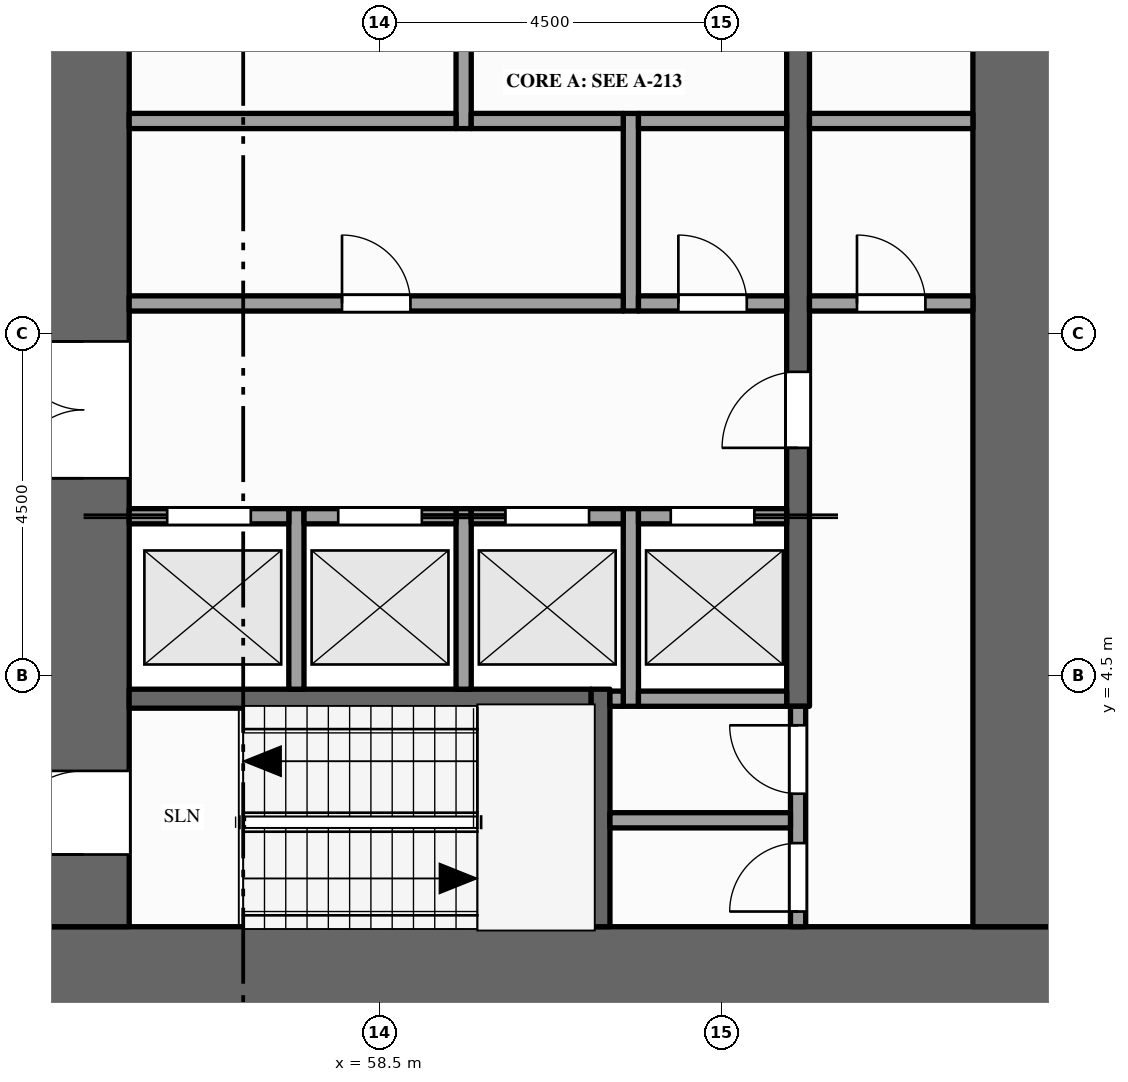
"""IFC4 building model, lengths in metres.
Left out: names, types, materials, properties, quantities, classifications, styles, units other than length and angle.
Written with IfcOpenShell. Run it as: python <this file> out.ifc"""

import sys

from ifc_helpers import new_model, si_unit, direction, frame, frame_2d, origin, place, context, subcontext, project, spatial, rectangle, extrude, element, fill, save


model = new_model("IFC4")
c1 = context("Model", 3, precision=1e-05, world=origin(), true_north=direction((0.0, 1.0)))
c2 = subcontext(c1, "Body", "Model", "MODEL_VIEW")
j1 = project(units=[si_unit("LENGTHUNIT", "METRE"), si_unit("PLANEANGLEUNIT", "RADIAN")], contexts=[c1])
p1 = place(None, origin())
s1 = spatial("IfcSite", under=j1, at=p1, CompositionType="ELEMENT")
p2 = place(p1, origin())
s2 = spatial("IfcBuilding", under=s1, at=p2, CompositionType="ELEMENT")
p3 = place(p2, frame((0.0, 0.0, 69.0)))
s3 = spatial("IfcBuildingStorey", under=s2, at=p3, CompositionType="ELEMENT", Elevation=69.0)
p4 = place(p3, frame((67.5, 0.6, -0.15), z_axis=(0.0, 0.0, 1.0), x_axis=(-1.0, 0.0, 0.0)))
e1 = element("IfcWall", 1, at=p4, inside=s3, PredefinedType="SHEAR", context=c2, shape_type="SweptSolid", body=[
    extrude(rectangle(XDim=13.5, YDim=1.2, at=frame_2d((6.75, 0.0))), origin(), (0.0, 0.0, 1.0), 4.0),
])
p5 = place(p3, frame((54.6, 1.2, -0.15), z_axis=(0.0, 0.0, 1.0), x_axis=(0.0, 1.0, 0.0)))
e2 = element("IfcWall", 2, at=p5, inside=s3, PredefinedType="SHEAR", context=c2, shape_type="SweptSolid", body=[
    extrude(rectangle(XDim=20.1, YDim=1.2, at=frame_2d((10.05, 0.0))), origin(), (0.0, 0.0, 1.0), 4.0),
])
p6 = place(p5, frame((5.9, 0.0, 0.15)))
e3 = element("IfcOpeningElement", 3, at=p6, cuts=e2, PredefinedType="OPENING", context=c2, shape_type="SweptSolid", body=[
    extrude(rectangle(XDim=1.8, YDim=2.1, at=frame_2d((0.9, 1.05))), frame((0.0, 0.61, 0.0), z_axis=(0.0, -1.0, 0.0), x_axis=(1.0, 0.0, 0.0)), (0.0, 0.0, 1.0), 1.22),
])
p7 = place(p5, frame((11.95, 0.0, 0.15)))
e4 = element("IfcOpeningElement", 4, at=p7, cuts=e2, PredefinedType="OPENING", context=c2, shape_type="SweptSolid", body=[
    extrude(rectangle(XDim=1.1, YDim=2.1, at=frame_2d((0.55, 1.05))), frame((0.0, 0.61, 0.0), z_axis=(0.0, -1.0, 0.0), x_axis=(1.0, 0.0, 0.0)), (0.0, 0.0, 1.0), 1.22),
])
p8 = place(p5, frame((0.95, 0.0, 0.15)))
e5 = element("IfcOpeningElement", 5, at=p8, cuts=e2, PredefinedType="OPENING", context=c2, shape_type="SweptSolid", body=[
    extrude(rectangle(XDim=1.1, YDim=2.1, at=frame_2d((0.55, 1.05))), frame((0.0, 0.61, 0.0), z_axis=(0.0, -1.0, 0.0), x_axis=(1.0, 0.0, 0.0)), (0.0, 0.0, 1.0), 1.22),
])
p9 = place(p5, frame((18.15, 0.0, 0.15)))
e6 = element("IfcOpeningElement", 6, at=p9, cuts=e2, PredefinedType="OPENING", context=c2, shape_type="SweptSolid", body=[
    extrude(rectangle(XDim=1.1, YDim=2.1, at=frame_2d((0.55, 1.05))), frame((0.0, 0.61, 0.0), z_axis=(0.0, -1.0, 0.0), x_axis=(1.0, 0.0, 0.0)), (0.0, 0.0, 1.0), 1.22),
])
p10 = place(p3, frame((66.9, 1.2, -0.15), z_axis=(0.0, 0.0, 1.0), x_axis=(0.0, 1.0, 0.0)))
e7 = element("IfcWall", 7, at=p10, inside=s3, PredefinedType="SHEAR", context=c2, shape_type="SweptSolid", body=[
    extrude(rectangle(XDim=20.1, YDim=1.2, at=frame_2d((10.05, 0.0))), origin(), (0.0, 0.0, 1.0), 4.0),
])
for number, where, z_axis, x_axis in (
    (8, (57.4, 4.325, 0.0), (0.0, 0.0, 1.0), (0.0, 1.0, 0.0)),
    (9, (59.6, 4.325, 0.0), (0.0, 0.0, 1.0), (0.0, 1.0, 0.0)),
):
    element("IfcWall", number, at=place(p3, frame(where, z_axis=z_axis, x_axis=x_axis)), inside=s3, PredefinedType="SOLIDWALL", context=c2, shape_type="SweptSolid", body=[
        extrude(rectangle(XDim=2.375, YDim=0.2, at=frame_2d((1.188, 0.0))), origin(), (0.0, 0.0, 1.0), 3.85),
    ])
p11 = place(p3, frame((59.6, 11.7, 0.0), z_axis=(0.0, 0.0, 1.0), x_axis=(0.0, 1.0, 0.0)))
e10 = element("IfcWall", 10, at=p11, inside=s3, PredefinedType="PARTITIONING", context=c2, shape_type="SweptSolid", body=[
    extrude(rectangle(XDim=3.8, YDim=0.2, at=frame_2d((1.9, 0.0))), origin(), (0.0, 0.0, 1.0), 3.85),
])
p12 = place(p11, frame((1.5, 0.0, 0.0)))
e11 = element("IfcOpeningElement", 11, at=p12, cuts=e10, PredefinedType="OPENING", context=c2, shape_type="SweptSolid", body=[
    extrude(rectangle(XDim=1.0, YDim=2.1, at=frame_2d((0.5, 1.05))), frame((0.0, 0.11, 0.0), z_axis=(0.0, -1.0, 0.0), x_axis=(1.0, 0.0, 0.0)), (0.0, 0.0, 1.0), 0.22),
])
p13 = place(p3, frame((61.4, 1.2, 0.0), z_axis=(0.0, 0.0, 1.0), x_axis=(0.0, 1.0, 0.0)))
e12 = element("IfcWall", 12, at=p13, inside=s3, PredefinedType="SHEAR", context=c2, shape_type="SweptSolid", body=[
    extrude(rectangle(XDim=3.125, YDim=0.25, at=frame_2d((1.562, 0.0))), origin(), (0.0, 0.0, 1.0), 3.85),
])
p14 = place(p3, frame((61.8, 4.1, 0.0), z_axis=(0.0, 0.0, 1.0), x_axis=(0.0, 1.0, 0.0)))
e13 = element("IfcWall", 13, at=p14, inside=s3, PredefinedType="SOLIDWALL", context=c2, shape_type="SweptSolid", body=[
    extrude(rectangle(XDim=2.6, YDim=0.2, at=frame_2d((1.3, 0.0))), origin(), (0.0, 0.0, 1.0), 3.85),
])
p15 = place(p3, frame((61.8, 9.3, 0.0), z_axis=(0.0, 0.0, 1.0), x_axis=(0.0, 1.0, 0.0)))
e14 = element("IfcWall", 14, at=p15, inside=s3, PredefinedType="PARTITIONING", context=c2, shape_type="SweptSolid", body=[
    extrude(rectangle(XDim=2.6, YDim=0.2, at=frame_2d((1.3, 0.0))), origin(), (0.0, 0.0, 1.0), 3.85),
])
p16 = place(p3, frame((64.0, 1.2, 0.0), z_axis=(0.0, 0.0, 1.0), x_axis=(0.0, 1.0, 0.0)))
e15 = element("IfcWall", 15, at=p16, inside=s3, PredefinedType="PARTITIONING", context=c2, shape_type="SweptSolid", body=[
    extrude(rectangle(XDim=2.9, YDim=0.2, at=frame_2d((1.45, 0.0))), origin(), (0.0, 0.0, 1.0), 3.85),
])
p17 = place(p16, frame((0.2, 0.0, 0.0)))
e16 = element("IfcOpeningElement", 16, at=p17, cuts=e15, PredefinedType="OPENING", context=c2, shape_type="SweptSolid", body=[
    extrude(rectangle(XDim=0.9, YDim=2.1, at=frame_2d((0.45, 1.05))), frame((0.0, 0.11, 0.0), z_axis=(0.0, -1.0, 0.0), x_axis=(1.0, 0.0, 0.0)), (0.0, 0.0, 1.0), 0.22),
])
p18 = place(p16, frame((1.75, 0.0, 0.0)))
e17 = element("IfcOpeningElement", 17, at=p18, cuts=e15, PredefinedType="OPENING", context=c2, shape_type="SweptSolid", body=[
    extrude(rectangle(XDim=0.9, YDim=2.1, at=frame_2d((0.45, 1.05))), frame((0.0, 0.11, 0.0), z_axis=(0.0, -1.0, 0.0), x_axis=(1.0, 0.0, 0.0)), (0.0, 0.0, 1.0), 0.22),
])
p19 = place(p3, frame((64.0, 4.1, 0.0), z_axis=(0.0, 0.0, 1.0), x_axis=(0.0, 1.0, 0.0)))
e18 = element("IfcWall", 18, at=p19, inside=s3, PredefinedType="SHEAR", context=c2, shape_type="SweptSolid", body=[
    extrude(rectangle(XDim=14.5, YDim=0.3, at=frame_2d((7.25, 0.0))), origin(), (0.0, 0.0, 1.0), 3.85),
])
p20 = place(p19, frame((3.4, 0.0, 0.0)))
e19 = element("IfcOpeningElement", 19, at=p20, cuts=e18, PredefinedType="OPENING", context=c2, shape_type="SweptSolid", body=[
    extrude(rectangle(XDim=1.0, YDim=2.1, at=frame_2d((0.5, 1.05))), frame((0.0, 0.16, 0.0), z_axis=(0.0, -1.0, 0.0), x_axis=(1.0, 0.0, 0.0)), (0.0, 0.0, 1.0), 0.32),
])
p21 = place(p19, frame((9.1, 0.0, 0.0)))
e20 = element("IfcOpeningElement", 20, at=p21, cuts=e18, PredefinedType="OPENING", context=c2, shape_type="SweptSolid", body=[
    extrude(rectangle(XDim=1.0, YDim=2.1, at=frame_2d((0.5, 1.05))), frame((0.0, 0.16, 0.0), z_axis=(0.0, -1.0, 0.0), x_axis=(1.0, 0.0, 0.0)), (0.0, 0.0, 1.0), 0.32),
])
p22 = place(p3, frame((61.525, 2.6, 0.0), z_axis=(0.0, 0.0, 1.0), x_axis=(1.0, 0.0, 0.0)))
e21 = element("IfcWall", 21, at=p22, inside=s3, PredefinedType="PARTITIONING", context=c2, shape_type="SweptSolid", body=[
    extrude(rectangle(XDim=2.375, YDim=0.2, at=frame_2d((1.188, 0.0))), origin(), (0.0, 0.0, 1.0), 3.85),
])
p23 = place(p3, frame((55.2, 4.2, 0.0), z_axis=(0.0, 0.0, 1.0), x_axis=(1.0, 0.0, 0.0)))
e22 = element("IfcWall", 22, at=p23, inside=s3, PredefinedType="SHEAR", context=c2, shape_type="SweptSolid", body=[
    extrude(rectangle(XDim=6.075, YDim=0.25, at=frame_2d((3.038, 0.0))), origin(), (0.0, 0.0, 1.0), 3.85),
])
p24 = place(p3, frame((61.525, 4.2, 0.0), z_axis=(0.0, 0.0, 1.0), x_axis=(1.0, 0.0, 0.0)))
e23 = element("IfcWall", 23, at=p24, inside=s3, PredefinedType="SOLIDWALL", context=c2, shape_type="SweptSolid", body=[
    extrude(rectangle(XDim=0.175, YDim=0.2, at=frame_2d((0.087, 0.0))), origin(), (0.0, 0.0, 1.0), 3.85),
])
p25 = place(p3, frame((61.9, 4.2, 0.0), z_axis=(0.0, 0.0, 1.0), x_axis=(1.0, 0.0, 0.0)))
e24 = element("IfcWall", 24, at=p25, inside=s3, PredefinedType="SOLIDWALL", context=c2, shape_type="SweptSolid", body=[
    extrude(rectangle(XDim=1.95, YDim=0.2, at=frame_2d((0.975, 0.0))), origin(), (0.0, 0.0, 1.0), 3.85),
])
p26 = place(p3, frame((55.2, 6.6, 0.0), z_axis=(0.0, 0.0, 1.0), x_axis=(1.0, 0.0, 0.0)))
e25 = element("IfcWall", 25, at=p26, inside=s3, PredefinedType="SOLIDWALL", context=c2, shape_type="SweptSolid", body=[
    extrude(rectangle(XDim=2.1, YDim=0.2, at=frame_2d((1.05, 0.0))), origin(), (0.0, 0.0, 1.0), 3.85),
])
p27 = place(p26, frame((0.5, 0.0, 0.012)))
e26 = element("IfcOpeningElement", 26, at=p27, cuts=e25, PredefinedType="OPENING", context=c2, shape_type="SweptSolid", body=[
    extrude(rectangle(XDim=1.1, YDim=2.1, at=frame_2d((0.55, 1.05))), frame((0.0, 0.11, 0.0), z_axis=(0.0, -1.0, 0.0), x_axis=(1.0, 0.0, 0.0)), (0.0, 0.0, 1.0), 0.22),
])
p28 = place(p3, frame((57.5, 6.6, 0.0), z_axis=(0.0, 0.0, 1.0), x_axis=(1.0, 0.0, 0.0)))
e27 = element("IfcWall", 27, at=p28, inside=s3, PredefinedType="SOLIDWALL", context=c2, shape_type="SweptSolid", body=[
    extrude(rectangle(XDim=2.0, YDim=0.2, at=frame_2d((1.0, 0.0))), origin(), (0.0, 0.0, 1.0), 3.85),
])
p29 = place(p28, frame((0.45, 0.0, 0.012)))
e28 = element("IfcOpeningElement", 28, at=p29, cuts=e27, PredefinedType="OPENING", context=c2, shape_type="SweptSolid", body=[
    extrude(rectangle(XDim=1.1, YDim=2.1, at=frame_2d((0.55, 1.05))), frame((0.0, 0.11, 0.0), z_axis=(0.0, -1.0, 0.0), x_axis=(1.0, 0.0, 0.0)), (0.0, 0.0, 1.0), 0.22),
])
p30 = place(p3, frame((59.7, 6.6, 0.0), z_axis=(0.0, 0.0, 1.0), x_axis=(1.0, 0.0, 0.0)))
e29 = element("IfcWall", 29, at=p30, inside=s3, PredefinedType="SOLIDWALL", context=c2, shape_type="SweptSolid", body=[
    extrude(rectangle(XDim=2.0, YDim=0.2, at=frame_2d((1.0, 0.0))), origin(), (0.0, 0.0, 1.0), 3.85),
])
p31 = place(p30, frame((0.45, 0.0, 0.012)))
e30 = element("IfcOpeningElement", 30, at=p31, cuts=e29, PredefinedType="OPENING", context=c2, shape_type="SweptSolid", body=[
    extrude(rectangle(XDim=1.1, YDim=2.1, at=frame_2d((0.55, 1.05))), frame((0.0, 0.11, 0.0), z_axis=(0.0, -1.0, 0.0), x_axis=(1.0, 0.0, 0.0)), (0.0, 0.0, 1.0), 0.22),
])
p32 = place(p3, frame((61.9, 6.6, 0.0), z_axis=(0.0, 0.0, 1.0), x_axis=(1.0, 0.0, 0.0)))
e31 = element("IfcWall", 31, at=p32, inside=s3, PredefinedType="SOLIDWALL", context=c2, shape_type="SweptSolid", body=[
    extrude(rectangle(XDim=1.95, YDim=0.2, at=frame_2d((0.975, 0.0))), origin(), (0.0, 0.0, 1.0), 3.85),
])
p33 = place(p32, frame((0.425, 0.0, 0.012)))
e32 = element("IfcOpeningElement", 32, at=p33, cuts=e31, PredefinedType="OPENING", context=c2, shape_type="SweptSolid", body=[
    extrude(rectangle(XDim=1.1, YDim=2.1, at=frame_2d((0.55, 1.05))), frame((0.0, 0.11, 0.0), z_axis=(0.0, -1.0, 0.0), x_axis=(1.0, 0.0, 0.0)), (0.0, 0.0, 1.0), 0.22),
])
p34 = place(p3, frame((55.2, 9.4, 0.0), z_axis=(0.0, 0.0, 1.0), x_axis=(1.0, 0.0, 0.0)))
e33 = element("IfcWall", 33, at=p34, inside=s3, PredefinedType="PARTITIONING", context=c2, shape_type="SweptSolid", body=[
    extrude(rectangle(XDim=6.5, YDim=0.2, at=frame_2d((3.25, 0.0))), origin(), (0.0, 0.0, 1.0), 3.85),
])
p35 = place(p34, frame((2.8, 0.0, 0.0)))
e34 = element("IfcOpeningElement", 34, at=p35, cuts=e33, PredefinedType="OPENING", context=c2, shape_type="SweptSolid", body=[
    extrude(rectangle(XDim=0.9, YDim=2.1, at=frame_2d((0.45, 1.05))), frame((0.0, 0.11, 0.0), z_axis=(0.0, -1.0, 0.0), x_axis=(1.0, 0.0, 0.0)), (0.0, 0.0, 1.0), 0.22),
])
p36 = place(p3, frame((61.9, 9.4, 0.0), z_axis=(0.0, 0.0, 1.0), x_axis=(1.0, 0.0, 0.0)))
e35 = element("IfcWall", 35, at=p36, inside=s3, PredefinedType="PARTITIONING", context=c2, shape_type="SweptSolid", body=[
    extrude(rectangle(XDim=1.95, YDim=0.2, at=frame_2d((0.975, 0.0))), origin(), (0.0, 0.0, 1.0), 3.85),
])
p37 = place(p36, frame((0.525, 0.0, 0.0)))
e36 = element("IfcOpeningElement", 36, at=p37, cuts=e35, PredefinedType="OPENING", context=c2, shape_type="SweptSolid", body=[
    extrude(rectangle(XDim=0.9, YDim=2.1, at=frame_2d((0.45, 1.05))), frame((0.0, 0.11, 0.0), z_axis=(0.0, -1.0, 0.0), x_axis=(1.0, 0.0, 0.0)), (0.0, 0.0, 1.0), 0.22),
])
p38 = place(p3, frame((64.15, 9.4, 0.0), z_axis=(0.0, 0.0, 1.0), x_axis=(1.0, 0.0, 0.0)))
e37 = element("IfcWall", 37, at=p38, inside=s3, PredefinedType="PARTITIONING", context=c2, shape_type="SweptSolid", body=[
    extrude(rectangle(XDim=2.15, YDim=0.2, at=frame_2d((1.075, 0.0))), origin(), (0.0, 0.0, 1.0), 3.85),
])
p39 = place(p38, frame((0.625, 0.0, 0.0)))
e38 = element("IfcOpeningElement", 38, at=p39, cuts=e37, PredefinedType="OPENING", context=c2, shape_type="SweptSolid", body=[
    extrude(rectangle(XDim=0.9, YDim=2.1, at=frame_2d((0.45, 1.05))), frame((0.0, 0.11, 0.0), z_axis=(0.0, -1.0, 0.0), x_axis=(1.0, 0.0, 0.0)), (0.0, 0.0, 1.0), 0.22),
])
p40 = place(p3, frame((55.2, 11.8, 0.0), z_axis=(0.0, 0.0, 1.0), x_axis=(1.0, 0.0, 0.0)))
e39 = element("IfcWall", 39, at=p40, inside=s3, PredefinedType="PARTITIONING", context=c2, shape_type="SweptSolid", body=[
    extrude(rectangle(XDim=4.3, YDim=0.2, at=frame_2d((2.15, 0.0))), origin(), (0.0, 0.0, 1.0), 3.85),
])
p41 = place(p3, frame((59.7, 11.8, 0.0), z_axis=(0.0, 0.0, 1.0), x_axis=(1.0, 0.0, 0.0)))
e40 = element("IfcWall", 40, at=p41, inside=s3, PredefinedType="PARTITIONING", context=c2, shape_type="SweptSolid", body=[
    extrude(rectangle(XDim=2.0, YDim=0.2, at=frame_2d((1.0, 0.0))), origin(), (0.0, 0.0, 1.0), 3.85),
])
p42 = place(p3, frame((61.9, 11.8, 0.0), z_axis=(0.0, 0.0, 1.0), x_axis=(1.0, 0.0, 0.0)))
e41 = element("IfcWall", 41, at=p42, inside=s3, PredefinedType="PARTITIONING", context=c2, shape_type="SweptSolid", body=[
    extrude(rectangle(XDim=1.95, YDim=0.2, at=frame_2d((0.975, 0.0))), origin(), (0.0, 0.0, 1.0), 3.85),
])
p43 = place(p3, frame((64.15, 11.8, 0.0), z_axis=(0.0, 0.0, 1.0), x_axis=(1.0, 0.0, 0.0)))
e42 = element("IfcWall", 42, at=p43, inside=s3, PredefinedType="PARTITIONING", context=c2, shape_type="SweptSolid", body=[
    extrude(rectangle(XDim=2.15, YDim=0.2, at=frame_2d((1.075, 0.0))), origin(), (0.0, 0.0, 1.0), 3.85),
])
p44 = place(p27, origin())
e43 = element("IfcDoor", 43, at=p44, inside=s3, OperationType="SLIDING_TO_LEFT", PredefinedType="DOOR", context=c2, shape_type="SweptSolid", body=[
    extrude(rectangle(XDim=1.1, YDim=2.1, at=frame_2d((0.55, 1.05))), frame((0.0, 0.025, 0.0), z_axis=(0.0, -1.0, 0.0), x_axis=(1.0, 0.0, 0.0)), (0.0, 0.0, 1.0), 0.05),
])
fill(e26, e43)
p45 = place(p29, origin())
e44 = element("IfcDoor", 44, at=p45, inside=s3, OperationType="SLIDING_TO_RIGHT", PredefinedType="DOOR", context=c2, shape_type="SweptSolid", body=[
    extrude(rectangle(XDim=1.1, YDim=2.1, at=frame_2d((0.55, 1.05))), frame((0.0, 0.025, 0.0), z_axis=(0.0, -1.0, 0.0), x_axis=(1.0, 0.0, 0.0)), (0.0, 0.0, 1.0), 0.05),
])
fill(e28, e44)
p46 = place(p31, origin())
e45 = element("IfcDoor", 45, at=p46, inside=s3, OperationType="SLIDING_TO_LEFT", PredefinedType="DOOR", context=c2, shape_type="SweptSolid", body=[
    extrude(rectangle(XDim=1.1, YDim=2.1, at=frame_2d((0.55, 1.05))), frame((0.0, 0.025, 0.0), z_axis=(0.0, -1.0, 0.0), x_axis=(1.0, 0.0, 0.0)), (0.0, 0.0, 1.0), 0.05),
])
fill(e30, e45)
p47 = place(p33, origin())
e46 = element("IfcDoor", 46, at=p47, inside=s3, OperationType="SLIDING_TO_RIGHT", PredefinedType="DOOR", context=c2, shape_type="SweptSolid", body=[
    extrude(rectangle(XDim=1.1, YDim=2.1, at=frame_2d((0.55, 1.05))), frame((0.0, 0.025, 0.0), z_axis=(0.0, -1.0, 0.0), x_axis=(1.0, 0.0, 0.0)), (0.0, 0.0, 1.0), 0.05),
])
fill(e32, e46)
p48 = place(p6, origin())
e47 = element("IfcDoor", 47, at=p48, inside=s3, OperationType="DOUBLE_DOOR_SINGLE_SWING", PredefinedType="DOOR", context=c2, shape_type="SweptSolid", body=[
    extrude(rectangle(XDim=1.8, YDim=2.1, at=frame_2d((0.9, 1.05))), frame((0.0, 0.025, 0.0), z_axis=(0.0, -1.0, 0.0), x_axis=(1.0, 0.0, 0.0)), (0.0, 0.0, 1.0), 0.05),
])
fill(e3, e47)
p49 = place(p20, origin())
e48 = element("IfcDoor", 48, at=p49, inside=s3, OperationType="SINGLE_SWING_LEFT", PredefinedType="DOOR", context=c2, shape_type="SweptSolid", body=[
    extrude(rectangle(XDim=1.0, YDim=2.1, at=frame_2d((0.5, 1.05))), frame((0.0, 0.025, 0.0), z_axis=(0.0, -1.0, 0.0), x_axis=(1.0, 0.0, 0.0)), (0.0, 0.0, 1.0), 0.05),
])
fill(e19, e48)
p50 = place(p39, origin())
e49 = element("IfcDoor", 49, at=p50, inside=s3, OperationType="SINGLE_SWING_LEFT", PredefinedType="DOOR", context=c2, shape_type="SweptSolid", body=[
    extrude(rectangle(XDim=0.9, YDim=2.1, at=frame_2d((0.45, 1.05))), frame((0.0, 0.025, 0.0), z_axis=(0.0, -1.0, 0.0), x_axis=(1.0, 0.0, 0.0)), (0.0, 0.0, 1.0), 0.05),
])
fill(e38, e49)
p51 = place(p8, origin())
e50 = element("IfcDoor", 50, at=p51, inside=s3, OperationType="SINGLE_SWING_LEFT", PredefinedType="DOOR", context=c2, shape_type="SweptSolid", body=[
    extrude(rectangle(XDim=1.1, YDim=2.1, at=frame_2d((0.55, 1.05))), frame((0.0, 0.025, 0.0), z_axis=(0.0, -1.0, 0.0), x_axis=(1.0, 0.0, 0.0)), (0.0, 0.0, 1.0), 0.05),
])
fill(e5, e50)
p52 = place(p17, origin())
e51 = element("IfcDoor", 51, at=p52, inside=s3, OperationType="SINGLE_SWING_LEFT", PredefinedType="DOOR", context=c2, shape_type="SweptSolid", body=[
    extrude(rectangle(XDim=0.9, YDim=2.1, at=frame_2d((0.45, 1.05))), frame((0.0, 0.025, 0.0), z_axis=(0.0, -1.0, 0.0), x_axis=(1.0, 0.0, 0.0)), (0.0, 0.0, 1.0), 0.05),
])
fill(e16, e51)
p53 = place(p18, origin())
e52 = element("IfcDoor", 52, at=p53, inside=s3, OperationType="SINGLE_SWING_RIGHT", PredefinedType="DOOR", context=c2, shape_type="SweptSolid", body=[
    extrude(rectangle(XDim=0.9, YDim=2.1, at=frame_2d((0.45, 1.05))), frame((0.0, 0.025, 0.0), z_axis=(0.0, -1.0, 0.0), x_axis=(1.0, 0.0, 0.0)), (0.0, 0.0, 1.0), 0.05),
])
fill(e17, e52)
p54 = place(p35, origin())
e53 = element("IfcDoor", 53, at=p54, inside=s3, OperationType="SINGLE_SWING_LEFT", PredefinedType="DOOR", context=c2, shape_type="SweptSolid", body=[
    extrude(rectangle(XDim=0.9, YDim=2.1, at=frame_2d((0.45, 1.05))), frame((0.0, 0.025, 0.0), z_axis=(0.0, -1.0, 0.0), x_axis=(1.0, 0.0, 0.0)), (0.0, 0.0, 1.0), 0.05),
])
fill(e34, e53)
p55 = place(p37, origin())
e54 = element("IfcDoor", 54, at=p55, inside=s3, OperationType="SINGLE_SWING_LEFT", PredefinedType="DOOR", context=c2, shape_type="SweptSolid", body=[
    extrude(rectangle(XDim=0.9, YDim=2.1, at=frame_2d((0.45, 1.05))), frame((0.0, 0.025, 0.0), z_axis=(0.0, -1.0, 0.0), x_axis=(1.0, 0.0, 0.0)), (0.0, 0.0, 1.0), 0.05),
])
fill(e36, e54)
save(model, sys.argv[1])
